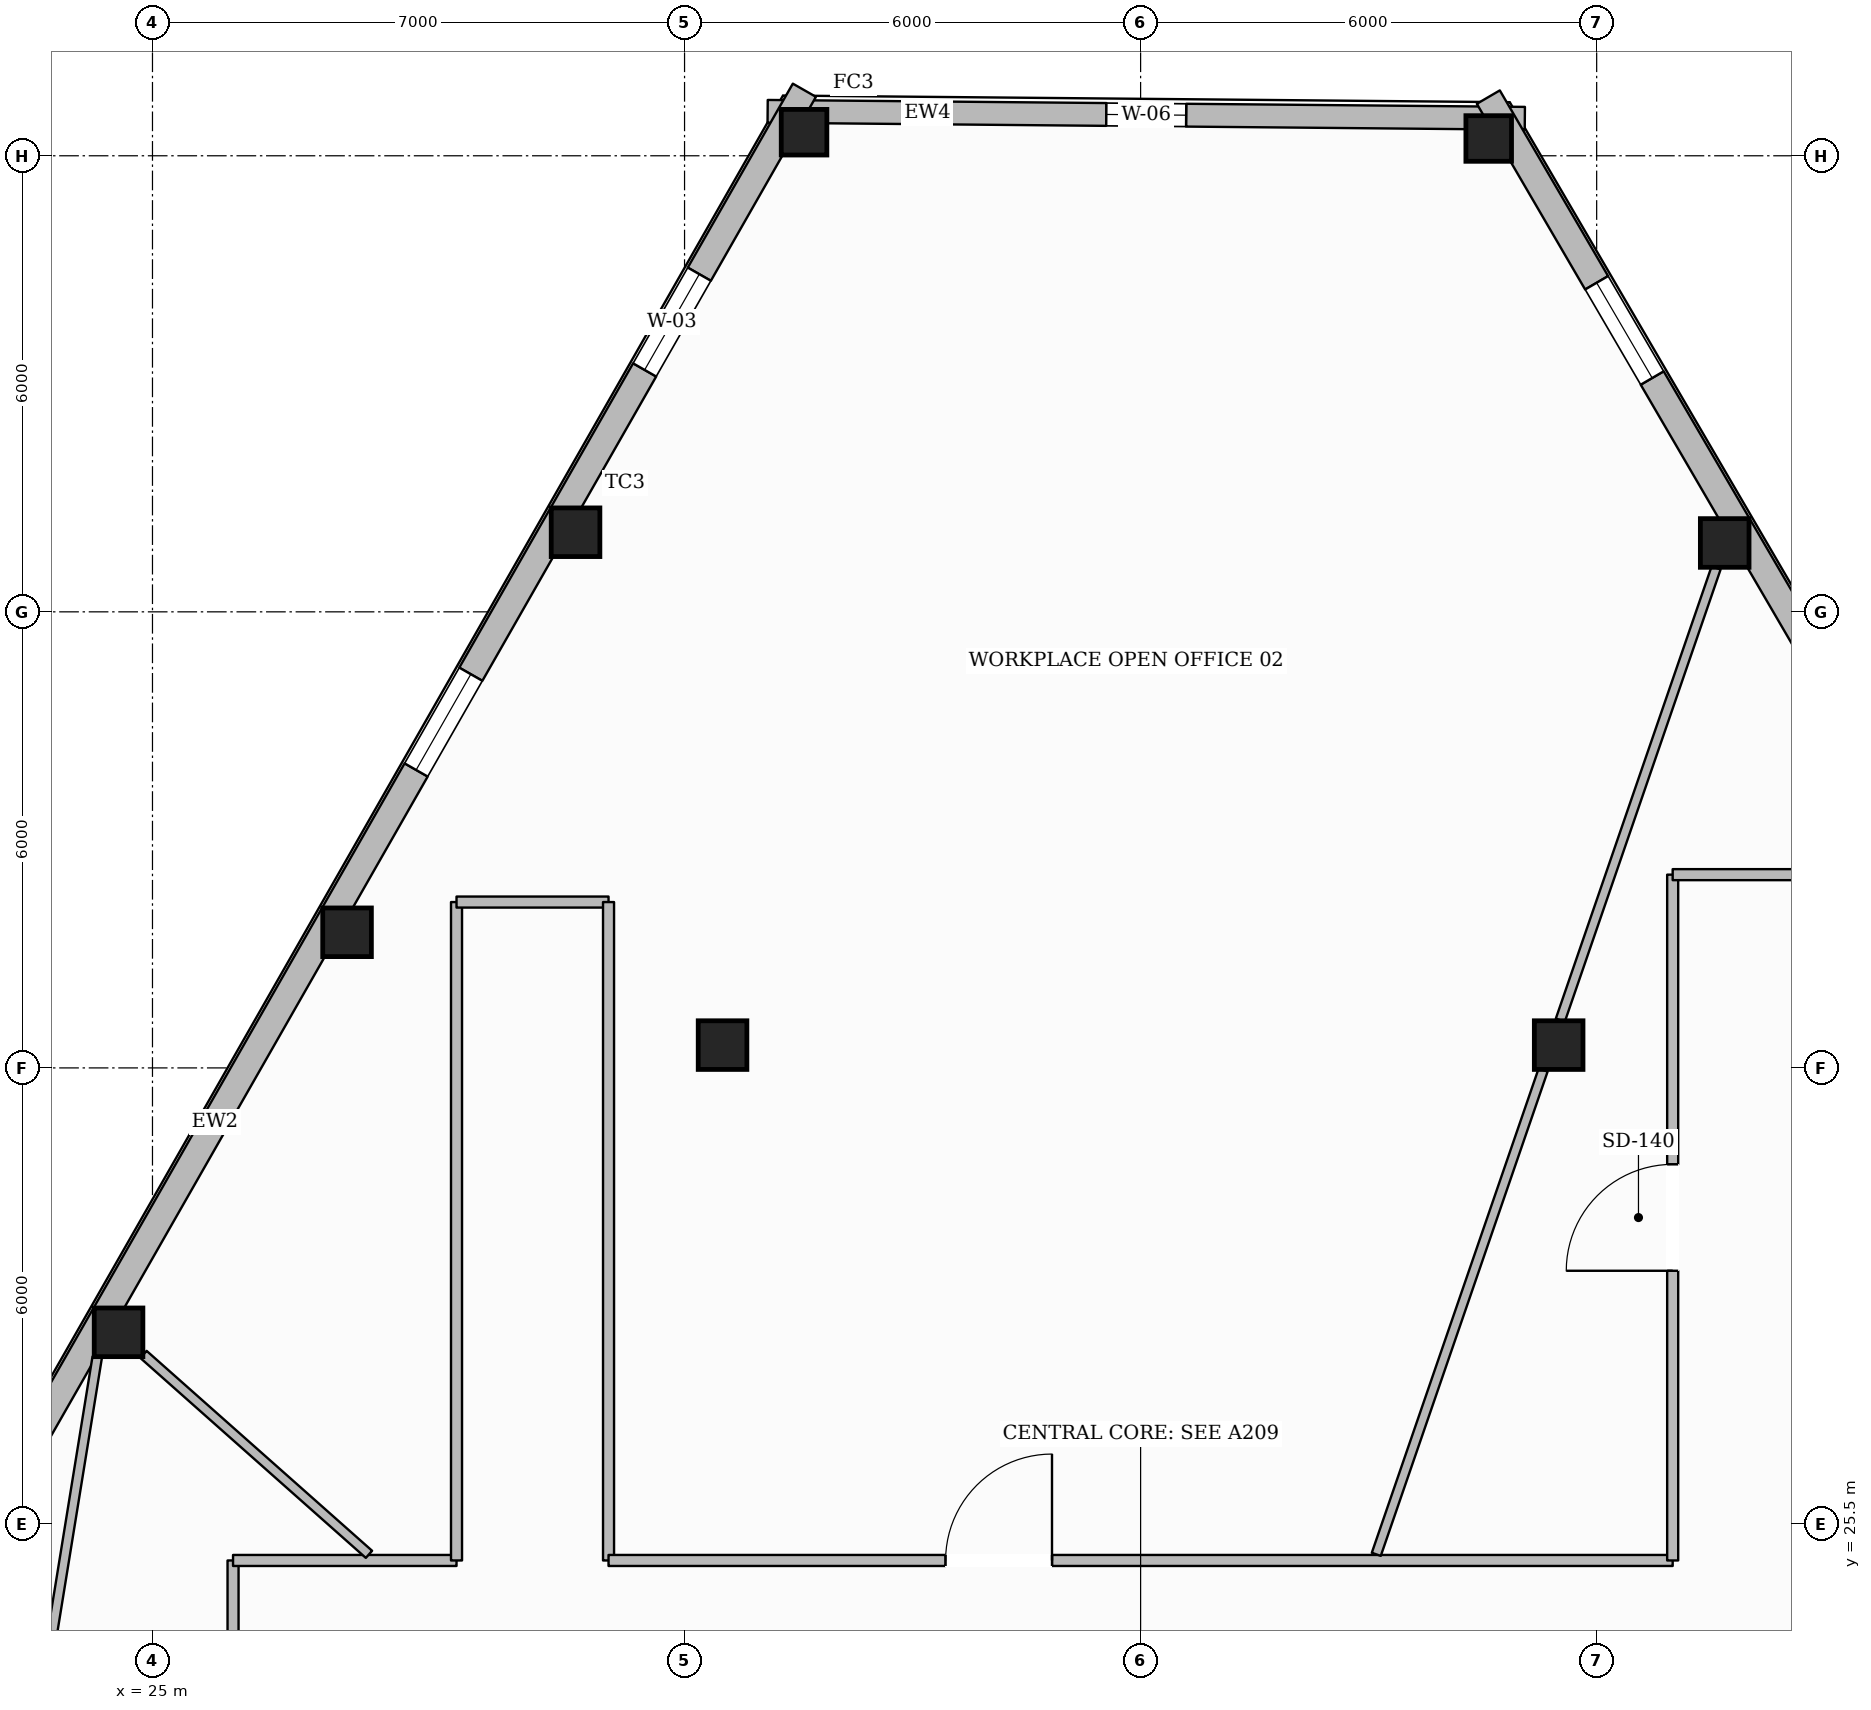
"""IFC4 building model, lengths in metres.
Left out: names, types, materials, properties, quantities, classifications, styles, units other than length and angle.
Written with IfcOpenShell. Run it as: python <this file> out.ifc"""

import sys

from ifc_helpers import new_model, si_unit, direction, frame, frame_2d, origin, origin_2d, place, context, subcontext, project, spatial, rectangle, hollow_rectangle, extrude, element, fill, save


model = new_model("IFC4")
c1 = context("Model", 3, precision=1e-05, world=origin(), true_north=direction((0.0, 1.0)))
c2 = subcontext(c1, "Body", "Model", "MODEL_VIEW")
j1 = project(units=[si_unit("LENGTHUNIT", "METRE"), si_unit("PLANEANGLEUNIT", "RADIAN")], contexts=[c1])
p1 = place(None, origin())
s1 = spatial("IfcSite", under=j1, at=p1, CompositionType="ELEMENT")
p2 = place(p1, origin())
s2 = spatial("IfcBuilding", under=s1, at=p2, CompositionType="ELEMENT")
p3 = place(p2, frame((0.0, 0.0, 188.1)))
s3 = spatial("IfcBuildingStorey", under=s2, at=p3, CompositionType="ELEMENT", Elevation=188.1)
p4 = place(p3, frame((33.572, 43.81, 0.0), z_axis=(0.0, 0.0, 1.0), x_axis=(1.0, 0.0, 0.0)))
e1 = element("IfcColumn", 1, at=p4, inside=s3, PredefinedType="COLUMN", context=c2, shape_type="SweptSolid", body=[
    extrude(hollow_rectangle(XDim=0.6, YDim=0.6, WallThickness=0.028, at=origin_2d()), origin(), (0.0, 0.0, 1.0), 3.6),
])
for number, where, z_axis, x_axis in (
    (2, (30.566, 38.547, 0.0), (0.0, 0.0, 1.0), (1.0, 0.0, 0.0)),
    (3, (27.56, 33.284, 0.0), (0.0, 0.0, 1.0), (1.0, 0.0, 0.0)),
    (4, (24.554, 28.021, 0.0), (0.0, 0.0, 1.0), (1.0, 0.0, 0.0)),
    (5, (45.684, 38.406, 0.0), (0.0, 0.0, 1.0), (1.0, 0.0, 0.0)),
):
    element("IfcColumn", number, at=place(p3, frame(where, z_axis=z_axis, x_axis=x_axis)), inside=s3, PredefinedType="COLUMN", context=c2, shape_type="SweptSolid", body=[
        extrude(hollow_rectangle(XDim=0.64, YDim=0.64, WallThickness=0.028, at=origin_2d()), origin(), (0.0, 0.0, 1.0), 3.6),
    ])
p5 = place(p3, frame((42.58, 43.727, 0.0), z_axis=(0.0, 0.0, 1.0), x_axis=(1.0, 0.0, 0.0)))
e6 = element("IfcColumn", 6, at=p5, inside=s3, PredefinedType="COLUMN", context=c2, shape_type="SweptSolid", body=[
    extrude(hollow_rectangle(XDim=0.6, YDim=0.6, WallThickness=0.028, at=origin_2d()), origin(), (0.0, 0.0, 1.0), 3.6),
])
for number, where, z_axis, x_axis in (
    (7, (32.5, 31.8, 0.0), (0.0, 0.0, 1.0), (1.0, 0.0, 0.0)),
    (8, (43.5, 31.8, 0.0), (0.0, 0.0, 1.0), (1.0, 0.0, 0.0)),
):
    element("IfcColumn", number, at=place(p3, frame(where, z_axis=z_axis, x_axis=x_axis)), inside=s3, PredefinedType="COLUMN", context=c2, shape_type="SweptSolid", body=[
        extrude(hollow_rectangle(XDim=0.64, YDim=0.64, WallThickness=0.028, at=origin_2d()), origin(), (0.0, 0.0, 1.0), 3.6),
    ])
p6 = place(p3, frame((33.093, 44.084, 0.0), z_axis=(0.0, 0.0, 1.0), x_axis=(0.999957994936, -0.009165607679, 0.0)))
e9 = element("IfcWall", 9, at=p6, inside=s3, PredefinedType="STANDARD", context=c2, shape_type="SweptSolid", body=[
    extrude(rectangle(XDim=9.962, YDim=0.3, at=frame_2d((4.981, 0.0))), origin(), (0.0, 0.0, 1.0), 3.132),
])
p7 = place(p6, frame((4.456, 0.0, 0.65)))
e10 = element("IfcOpeningElement", 10, at=p7, cuts=e9, PredefinedType="OPENING", context=c2, shape_type="SweptSolid", body=[
    extrude(rectangle(XDim=1.05, YDim=1.7, at=frame_2d((0.525, 0.85))), frame((0.0, 0.16, 0.0), z_axis=(0.0, -1.0, 0.0), x_axis=(1.0, 0.0, 0.0)), (0.0, 0.0, 1.0), 0.32),
])
p8 = place(p3, frame((15.064, 11.953, 0.0), z_axis=(0.0, 0.0, 1.0), x_axis=(0.495993114815, 0.86832645362, 0.0)))
e11 = element("IfcWall", 11, at=p8, inside=s3, PredefinedType="STANDARD", context=c2, shape_type="SweptSolid", body=[
    extrude(rectangle(XDim=37.324, YDim=0.35, at=frame_2d((18.662, 0.0))), origin(), (0.0, 0.0, 1.0), 3.132),
])
p9 = place(p8, frame((33.087, 0.0, 0.65)))
e12 = element("IfcOpeningElement", 12, at=p9, cuts=e11, PredefinedType="OPENING", context=c2, shape_type="SweptSolid", body=[
    extrude(rectangle(XDim=1.45, YDim=1.75, at=frame_2d((0.725, 0.875))), frame((0.0, 0.185, 0.0), z_axis=(0.0, -1.0, 0.0), x_axis=(1.0, 0.0, 0.0)), (0.0, 0.0, 1.0), 0.37),
])
p10 = place(p8, frame((27.026, 0.0, 0.65)))
e13 = element("IfcOpeningElement", 13, at=p10, cuts=e11, PredefinedType="OPENING", context=c2, shape_type="SweptSolid", body=[
    extrude(rectangle(XDim=1.45, YDim=1.75, at=frame_2d((0.725, 0.875))), frame((0.0, 0.185, 0.0), z_axis=(0.0, -1.0, 0.0), x_axis=(1.0, 0.0, 0.0)), (0.0, 0.0, 1.0), 0.37),
])
p11 = place(p8, frame((14.904, 0.0, 0.65)))
e14 = element("IfcOpeningElement", 14, at=p11, cuts=e11, PredefinedType="OPENING", context=c2, shape_type="SweptSolid", body=[
    extrude(rectangle(XDim=1.45, YDim=1.75, at=frame_2d((0.725, 0.875))), frame((0.0, 0.185, 0.0), z_axis=(0.0, -1.0, 0.0), x_axis=(1.0, 0.0, 0.0)), (0.0, 0.0, 1.0), 0.37),
])
p12 = place(p8, frame((8.844, 0.0, 0.65)))
e15 = element("IfcOpeningElement", 15, at=p12, cuts=e11, PredefinedType="OPENING", context=c2, shape_type="SweptSolid", body=[
    extrude(rectangle(XDim=1.45, YDim=1.75, at=frame_2d((0.725, 0.875))), frame((0.0, 0.185, 0.0), z_axis=(0.0, -1.0, 0.0), x_axis=(1.0, 0.0, 0.0)), (0.0, 0.0, 1.0), 0.37),
])
p13 = place(p8, frame((2.782, 0.0, 0.65)))
e16 = element("IfcOpeningElement", 16, at=p13, cuts=e11, PredefinedType="OPENING", context=c2, shape_type="SweptSolid", body=[
    extrude(rectangle(XDim=1.45, YDim=1.75, at=frame_2d((0.725, 0.875))), frame((0.0, 0.185, 0.0), z_axis=(0.0, -1.0, 0.0), x_axis=(1.0, 0.0, 0.0)), (0.0, 0.0, 1.0), 0.37),
])
p14 = place(p3, frame((42.575, 44.272, 0.0), z_axis=(0.0, 0.0, 1.0), x_axis=(0.503934681705, -0.863741764982, 0.0)))
e17 = element("IfcWall", 17, at=p14, inside=s3, PredefinedType="STANDARD", context=c2, shape_type="SweptSolid", body=[
    extrude(rectangle(XDim=37.915, YDim=0.35, at=frame_2d((18.958, 0.0))), origin(), (0.0, 0.0, 1.0), 3.132),
])
p15 = place(p14, frame((33.633, 0.0, 0.65)))
e18 = element("IfcOpeningElement", 18, at=p15, cuts=e17, PredefinedType="OPENING", context=c2, shape_type="SweptSolid", body=[
    extrude(rectangle(XDim=1.45, YDim=1.75, at=frame_2d((0.725, 0.875))), frame((0.0, 0.185, 0.0), z_axis=(0.0, -1.0, 0.0), x_axis=(1.0, 0.0, 0.0)), (0.0, 0.0, 1.0), 0.37),
])
p16 = place(p14, frame((27.472, 0.0, 0.65)))
e19 = element("IfcOpeningElement", 19, at=p16, cuts=e17, PredefinedType="OPENING", context=c2, shape_type="SweptSolid", body=[
    extrude(rectangle(XDim=1.45, YDim=1.75, at=frame_2d((0.725, 0.875))), frame((0.0, 0.185, 0.0), z_axis=(0.0, -1.0, 0.0), x_axis=(1.0, 0.0, 0.0)), (0.0, 0.0, 1.0), 0.37),
])
p17 = place(p14, frame((15.15, 0.0, 0.65)))
e20 = element("IfcOpeningElement", 20, at=p17, cuts=e17, PredefinedType="OPENING", context=c2, shape_type="SweptSolid", body=[
    extrude(rectangle(XDim=1.45, YDim=1.75, at=frame_2d((0.725, 0.875))), frame((0.0, 0.185, 0.0), z_axis=(0.0, -1.0, 0.0), x_axis=(1.0, 0.0, 0.0)), (0.0, 0.0, 1.0), 0.37),
])
p18 = place(p14, frame((8.989, 0.0, 0.65)))
e21 = element("IfcOpeningElement", 21, at=p18, cuts=e17, PredefinedType="OPENING", context=c2, shape_type="SweptSolid", body=[
    extrude(rectangle(XDim=1.45, YDim=1.75, at=frame_2d((0.725, 0.875))), frame((0.0, 0.185, 0.0), z_axis=(0.0, -1.0, 0.0), x_axis=(1.0, 0.0, 0.0)), (0.0, 0.0, 1.0), 0.37),
])
p19 = place(p14, frame((2.828, 0.0, 0.65)))
e22 = element("IfcOpeningElement", 22, at=p19, cuts=e17, PredefinedType="OPENING", context=c2, shape_type="SweptSolid", body=[
    extrude(rectangle(XDim=1.45, YDim=1.75, at=frame_2d((0.725, 0.875))), frame((0.0, 0.185, 0.0), z_axis=(0.0, -1.0, 0.0), x_axis=(1.0, 0.0, 0.0)), (0.0, 0.0, 1.0), 0.37),
])
p20 = place(p3, frame((26.06, 17.65, 0.0), z_axis=(0.0, 0.0, 1.0), x_axis=(0.0, 1.0, 0.0)))
e23 = element("IfcWall", 23, at=p20, inside=s3, PredefinedType="PARTITIONING", context=c2, shape_type="SweptSolid", body=[
    extrude(rectangle(XDim=7.37, YDim=0.145, at=frame_2d((3.685, 0.0))), origin(), (0.0, 0.0, 1.0), 3.339),
])
p21 = place(p20, frame((3.195, 0.0, 0.0)))
e24 = element("IfcOpeningElement", 24, at=p21, cuts=e23, PredefinedType="OPENING", context=c2, shape_type="SweptSolid", body=[
    extrude(rectangle(XDim=0.98, YDim=2.15, at=frame_2d((0.49, 1.075))), frame((0.0, 0.083, 0.0), z_axis=(0.0, -1.0, 0.0), x_axis=(1.0, 0.0, 0.0)), (0.0, 0.0, 1.0), 0.165),
])
p22 = place(p3, frame((26.06, 25.02, 0.0), z_axis=(0.0, 0.0, 1.0), x_axis=(1.0, 0.0, 0.0)))
e25 = element("IfcWall", 25, at=p22, inside=s3, PredefinedType="PARTITIONING", context=c2, shape_type="SweptSolid", body=[
    extrude(rectangle(XDim=2.94, YDim=0.145, at=frame_2d((1.47, 0.0))), origin(), (0.0, 0.0, 1.0), 3.6),
])
p23 = place(p3, frame((29.0, 25.02, 0.0), z_axis=(0.0, 0.0, 1.0), x_axis=(0.0, 1.0, 0.0)))
e26 = element("IfcWall", 26, at=p23, inside=s3, PredefinedType="PARTITIONING", context=c2, shape_type="SweptSolid", body=[
    extrude(rectangle(XDim=8.662, YDim=0.145, at=frame_2d((4.331, 0.0))), origin(), (0.0, 0.0, 1.0), 3.6),
])
p24 = place(p3, frame((29.0, 33.682, 0.0), z_axis=(0.0, 0.0, 1.0), x_axis=(1.0, 0.0, 0.0)))
e27 = element("IfcWall", 27, at=p24, inside=s3, PredefinedType="PARTITIONING", context=c2, shape_type="SweptSolid", body=[
    extrude(rectangle(XDim=2.0, YDim=0.145, at=frame_2d((1.0, 0.0))), origin(), (0.0, 0.0, 1.0), 3.6),
])
p25 = place(p3, frame((31.0, 33.682, 0.0), z_axis=(0.0, 0.0, 1.0), x_axis=(0.0, -1.0, 0.0)))
e28 = element("IfcWall", 28, at=p25, inside=s3, PredefinedType="PARTITIONING", context=c2, shape_type="SweptSolid", body=[
    extrude(rectangle(XDim=8.662, YDim=0.145, at=frame_2d((4.331, 0.0))), origin(), (0.0, 0.0, 1.0), 3.6),
])
p26 = place(p3, frame((31.0, 25.02, 0.0), z_axis=(0.0, 0.0, 1.0), x_axis=(1.0, 0.0, 0.0)))
e29 = element("IfcWall", 29, at=p26, inside=s3, PredefinedType="PARTITIONING", context=c2, shape_type="SweptSolid", body=[
    extrude(rectangle(XDim=14.0, YDim=0.145, at=frame_2d((7.0, 0.0))), origin(), (0.0, 0.0, 1.0), 3.6),
])
p27 = place(p26, frame((4.434, 0.0, 0.0)))
e30 = element("IfcOpeningElement", 30, at=p27, cuts=e29, PredefinedType="OPENING", context=c2, shape_type="SweptSolid", body=[
    extrude(rectangle(XDim=1.4, YDim=2.2, at=frame_2d((0.7, 1.1))), frame((0.0, 0.083, 0.0), z_axis=(0.0, -1.0, 0.0), x_axis=(1.0, 0.0, 0.0)), (0.0, 0.0, 1.0), 0.165),
])
p28 = place(p3, frame((45.0, 25.02, 0.0), z_axis=(0.0, 0.0, 1.0), x_axis=(0.0, 1.0, 0.0)))
e31 = element("IfcWall", 31, at=p28, inside=s3, PredefinedType="PARTITIONING", context=c2, shape_type="SweptSolid", body=[
    extrude(rectangle(XDim=9.022, YDim=0.145, at=frame_2d((4.511, 0.0))), origin(), (0.0, 0.0, 1.0), 3.6),
])
p29 = place(p28, frame((3.811, 0.0, 0.0)))
e32 = element("IfcOpeningElement", 32, at=p29, cuts=e31, PredefinedType="OPENING", context=c2, shape_type="SweptSolid", body=[
    extrude(rectangle(XDim=1.4, YDim=2.2, at=frame_2d((0.7, 1.1))), frame((0.0, 0.083, 0.0), z_axis=(0.0, -1.0, 0.0), x_axis=(1.0, 0.0, 0.0)), (0.0, 0.0, 1.0), 0.165),
])
p30 = place(p3, frame((45.0, 34.042, 0.0), z_axis=(0.0, 0.0, 1.0), x_axis=(1.0, 0.0, 0.0)))
e33 = element("IfcWall", 33, at=p30, inside=s3, PredefinedType="PARTITIONING", context=c2, shape_type="SweptSolid", body=[
    extrude(rectangle(XDim=2.0, YDim=0.145, at=frame_2d((1.0, 0.0))), origin(), (0.0, 0.0, 1.0), 3.6),
])
p31 = place(p3, frame((41.101, 25.101, 0.0), z_axis=(0.0, 0.0, 1.0), x_axis=(0.325732757855, 0.945461882077, 0.0)))
e34 = element("IfcWall", 34, at=p31, inside=s3, PredefinedType="PARTITIONING", context=c2, shape_type="SweptSolid", body=[
    extrude(rectangle(XDim=6.739, YDim=0.125, at=frame_2d((3.369, 0.0))), origin(), (0.0, 0.0, 1.0), 3.141),
])
p32 = place(p3, frame((43.521, 32.128, 0.0), z_axis=(0.0, 0.0, 1.0), x_axis=(0.325720467461, 0.945466116303, 0.0)))
e35 = element("IfcWall", 35, at=p32, inside=s3, PredefinedType="PARTITIONING", context=c2, shape_type="SweptSolid", body=[
    extrude(rectangle(XDim=6.293, YDim=0.125, at=frame_2d((3.146, 0.0))), origin(), (0.0, 0.0, 1.0), 3.6),
])
p33 = place(p3, frame((27.848, 25.101, 0.0), z_axis=(0.0, 0.0, 1.0), x_axis=(-0.748288582972, 0.66337334631, 0.0)))
e36 = element("IfcWall", 36, at=p33, inside=s3, PredefinedType="PARTITIONING", context=c2, shape_type="SweptSolid", body=[
    extrude(rectangle(XDim=3.965, YDim=0.125, at=frame_2d((1.982, 0.0))), origin(), (0.0, 0.0, 1.0), 3.141),
])
p34 = place(p3, frame((24.273, 27.694, 0.0), z_axis=(0.0, 0.0, 1.0), x_axis=(-0.160245052552, -0.987077263, 0.0)))
e37 = element("IfcWall", 37, at=p34, inside=s3, PredefinedType="PARTITIONING", context=c2, shape_type="SweptSolid", body=[
    extrude(rectangle(XDim=14.53, YDim=0.125, at=frame_2d((7.265, 0.0))), origin(), (0.0, 0.0, 1.0), 3.135),
])
p35 = place(p34, frame((6.665, 0.0, 0.0)))
e38 = element("IfcOpeningElement", 38, at=p35, cuts=e37, PredefinedType="OPENING", context=c2, shape_type="SweptSolid", body=[
    extrude(rectangle(XDim=0.98, YDim=2.15, at=frame_2d((0.49, 1.075))), frame((0.0, 0.073, 0.0), z_axis=(0.0, -1.0, 0.0), x_axis=(1.0, 0.0, 0.0)), (0.0, 0.0, 1.0), 0.145),
])
p36 = place(p9, origin())
e39 = element("IfcWindow", 39, at=p36, inside=s3, PartitioningType="SINGLE_PANEL", PredefinedType="WINDOW", context=c2, shape_type="SweptSolid", body=[
    extrude(rectangle(XDim=1.45, YDim=1.75, at=frame_2d((0.725, 0.875))), frame((0.0, 0.03, 0.0), z_axis=(0.0, -1.0, 0.0), x_axis=(1.0, 0.0, 0.0)), (0.0, 0.0, 1.0), 0.06),
])
fill(e12, e39)
p37 = place(p10, origin())
e40 = element("IfcWindow", 40, at=p37, inside=s3, PartitioningType="SINGLE_PANEL", PredefinedType="WINDOW", context=c2, shape_type="SweptSolid", body=[
    extrude(rectangle(XDim=1.45, YDim=1.75, at=frame_2d((0.725, 0.875))), frame((0.0, 0.03, 0.0), z_axis=(0.0, -1.0, 0.0), x_axis=(1.0, 0.0, 0.0)), (0.0, 0.0, 1.0), 0.06),
])
fill(e13, e40)
p38 = place(p19, origin())
e41 = element("IfcWindow", 41, at=p38, inside=s3, PartitioningType="SINGLE_PANEL", PredefinedType="WINDOW", context=c2, shape_type="SweptSolid", body=[
    extrude(rectangle(XDim=1.45, YDim=1.75, at=frame_2d((0.725, 0.875))), frame((0.0, 0.03, 0.0), z_axis=(0.0, -1.0, 0.0), x_axis=(1.0, 0.0, 0.0)), (0.0, 0.0, 1.0), 0.06),
])
fill(e22, e41)
p39 = place(p7, origin())
e42 = element("IfcWindow", 42, at=p39, inside=s3, PartitioningType="SINGLE_PANEL", PredefinedType="WINDOW", context=c2, shape_type="SweptSolid", body=[
    extrude(rectangle(XDim=1.05, YDim=1.7, at=frame_2d((0.525, 0.85))), frame((0.0, 0.03, 0.0), z_axis=(0.0, -1.0, 0.0), x_axis=(1.0, 0.0, 0.0)), (0.0, 0.0, 1.0), 0.06),
])
fill(e10, e42)
p40 = place(p29, origin())
e43 = element("IfcDoor", 43, at=p40, inside=s3, OperationType="SINGLE_SWING_LEFT", PredefinedType="DOOR", context=c2, shape_type="SweptSolid", body=[
    extrude(rectangle(XDim=1.4, YDim=2.2, at=frame_2d((0.7, 1.1))), frame((0.0, 0.025, 0.0), z_axis=(0.0, -1.0, 0.0), x_axis=(1.0, 0.0, 0.0)), (0.0, 0.0, 1.0), 0.05),
])
fill(e32, e43)
p41 = place(p27, origin())
e44 = element("IfcDoor", 44, at=p41, inside=s3, OperationType="SINGLE_SWING_RIGHT", PredefinedType="DOOR", context=c2, shape_type="SweptSolid", body=[
    extrude(rectangle(XDim=1.4, YDim=2.2, at=frame_2d((0.7, 1.1))), frame((0.0, 0.025, 0.0), z_axis=(0.0, -1.0, 0.0), x_axis=(1.0, 0.0, 0.0)), (0.0, 0.0, 1.0), 0.05),
])
fill(e30, e44)
save(model, sys.argv[1])
